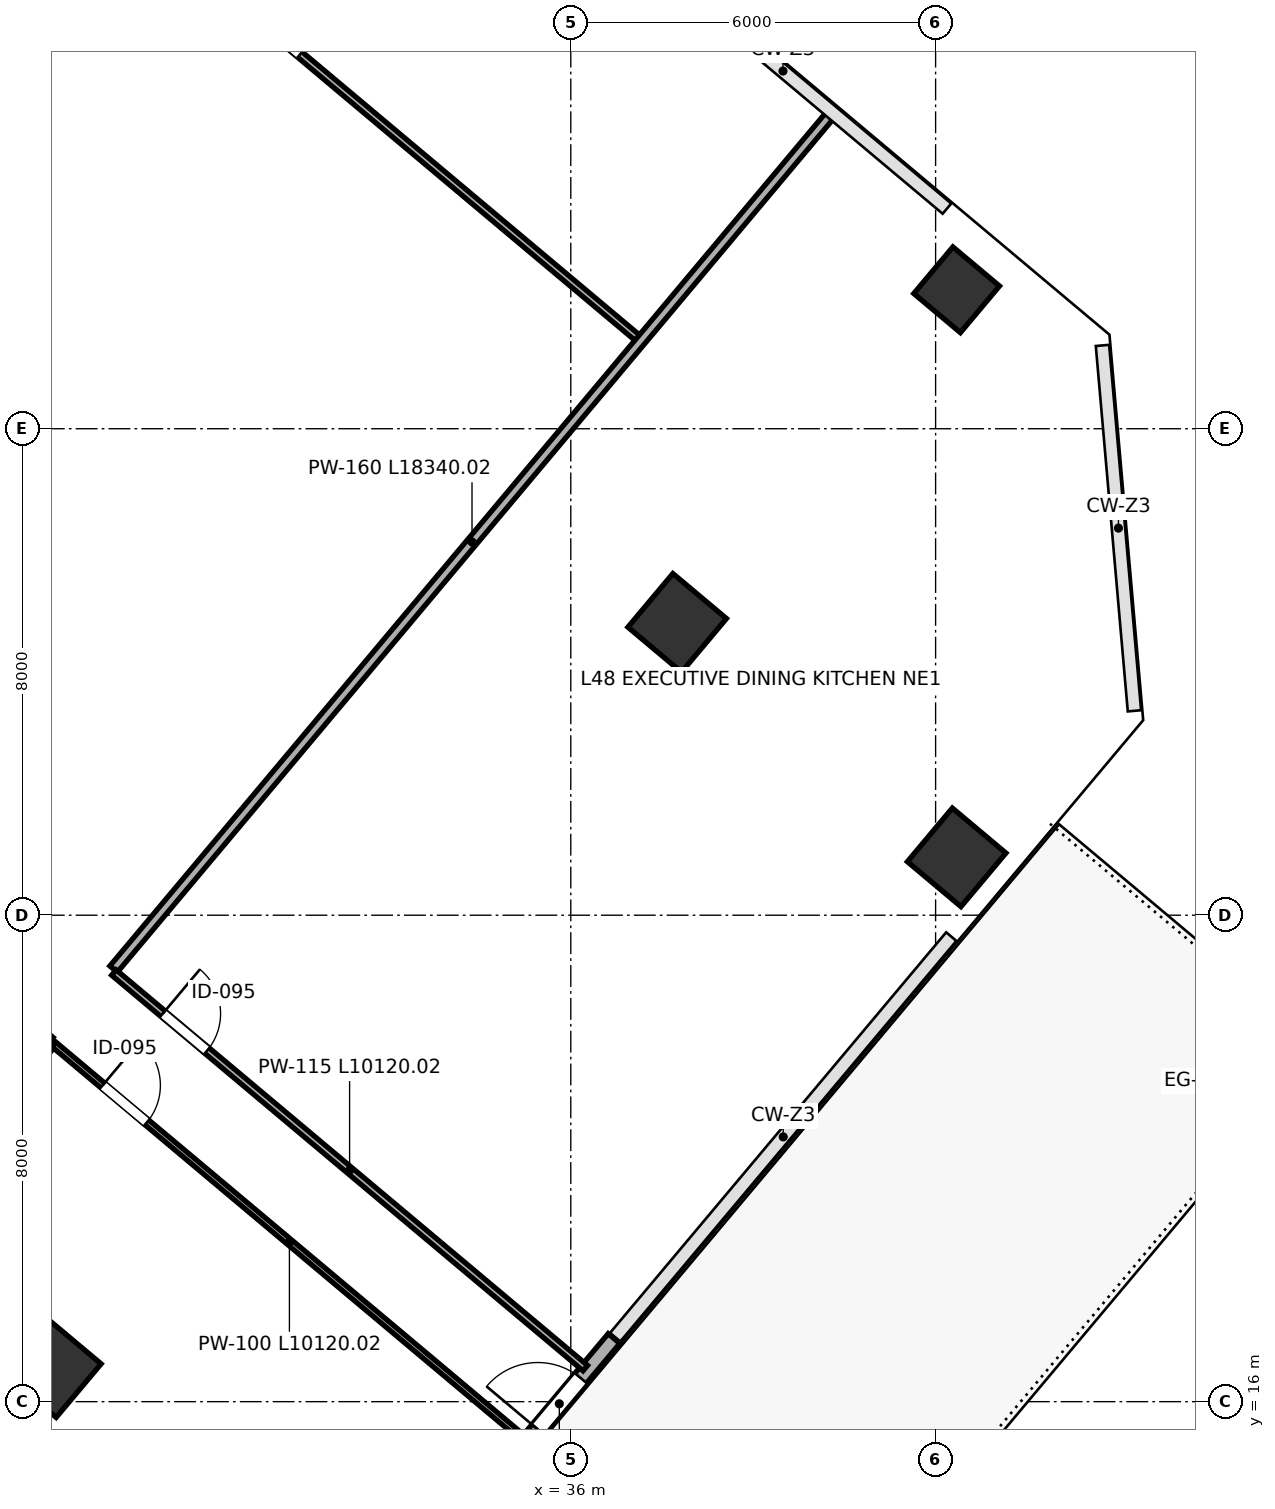
"""IFC4 building model, lengths in metres.
Left out: names, types, materials, properties, quantities, classifications, styles, units other than length and angle.
Written with IfcOpenShell. Run it as: python <this file> out.ifc"""

import sys

from ifc_helpers import new_model, si_unit, direction, frame, frame_2d, origin, origin_2d, place, context, subcontext, project, spatial, rectangle, extrude, source, transform, mapped, element, fill, save


model = new_model("IFC4")
c1 = context("Model", 3, precision=1e-05, world=origin(), true_north=direction((0.0, 1.0)))
c2 = subcontext(c1, "Body", "Model", "MODEL_VIEW")
j1 = project(units=[si_unit("LENGTHUNIT", "METRE"), si_unit("PLANEANGLEUNIT", "RADIAN")], contexts=[c1])
p1 = place(None, origin())
s1 = spatial("IfcSite", under=j1, at=p1, CompositionType="ELEMENT")
p2 = place(p1, origin())
s2 = spatial("IfcBuilding", under=s1, at=p2, CompositionType="ELEMENT")
p3 = place(p2, frame((0.0, 0.0, 215.2)))
s3 = spatial("IfcBuildingStorey", under=s2, at=p3, CompositionType="ELEMENT", Elevation=215.2)
m1 = source(origin(), c2, "Body", "SweptSolid", [
    extrude(rectangle(XDim=1.15, YDim=1.15, at=origin_2d()), origin(), (0.0, 0.0, 1.0), 5.399),
])
for number, where, z_axis, x_axis in (
    (1, (27.465, 16.551, 0.001), (0.0, 0.0, 1.0), (-0.766, 0.643, 0.0)),
    (2, (37.75, 28.808, 0.001), (0.0, 0.0, 1.0), (-0.766, 0.643, 0.0)),
):
    element("IfcColumn", number, at=place(p3, frame(where, z_axis=z_axis, x_axis=x_axis)), inside=s3, PredefinedType="COLUMN", context=c2, shape_type="MappedRepresentation", body=[
        mapped(m1, transform((0.0, 0.0, 0.0), scale=1.0)),
    ])
m2 = source(origin(), c2, "Body", "SweptSolid", [
    extrude(rectangle(XDim=1.0, YDim=1.0, at=origin_2d()), origin(), (0.0, 0.0, 1.0), 5.399),
])
p4 = place(p3, frame((42.346, 34.285, 0.001), z_axis=(0.0, 0.0, 1.0), x_axis=(-0.766044443119, 0.642787609687, 0.0)))
e3 = element("IfcColumn", 3, at=p4, inside=s3, PredefinedType="COLUMN", context=c2, shape_type="MappedRepresentation", body=[
    mapped(m2, transform((0.0, 0.0, 0.0), scale=1.0)),
])
m3 = source(origin(), c2, "Body", "SweptSolid", [
    extrude(rectangle(XDim=1.15, YDim=1.15, at=origin_2d()), origin(), (0.0, 0.0, 1.0), 5.399),
])
p5 = place(p3, frame((42.346, 24.951, 0.001), z_axis=(0.0, 0.0, 1.0), x_axis=(-0.766044443119, 0.642787609687, 0.0)))
e4 = element("IfcColumn", 4, at=p5, inside=s3, PredefinedType="COLUMN", context=c2, shape_type="MappedRepresentation", body=[
    mapped(m3, transform((0.0, 0.0, 0.0), scale=1.0)),
])
p6 = place(p3, frame((34.911, 14.893, 0.0), z_axis=(0.0, 0.0, 1.0), x_axis=(0.642770757628, 0.766058583359, 0.0)))
e5 = element("IfcWall", 5, at=p6, inside=s3, PredefinedType="SOLIDWALL", context=c2, shape_type="SweptSolid", body=[
    extrude(rectangle(XDim=2.8, YDim=0.25, at=frame_2d((1.4, 0.0))), origin(), (0.0, 0.0, 1.0), 5.16),
])
p7 = place(p6, frame((0.85, 0.0, 0.0)))
e6 = element("IfcOpeningElement", 6, at=p7, cuts=e5, PredefinedType="OPENING", context=c2, shape_type="SweptSolid", body=[
    extrude(rectangle(XDim=1.1, YDim=2.2, at=frame_2d((0.55, 1.1))), frame((0.0, 0.135, 0.0), z_axis=(0.0, -1.0, 0.0), x_axis=(1.0, 0.0, 0.0)), (0.0, 0.0, 1.0), 0.27),
])
p8 = place(p3, frame((25.093, 23.894, 0.0), z_axis=(0.0, 0.0, 1.0), x_axis=(0.76609008417, -0.642733212878, 0.0)))
e7 = element("IfcWall", 7, at=p8, inside=s3, PredefinedType="PARTITIONING", context=c2, shape_type="SweptSolid", body=[
    extrude(rectangle(XDim=3.058, YDim=0.16, at=frame_2d((1.529, 0.0))), origin(), (0.0, 0.0, 1.0), 5.16),
])
p9 = place(p3, frame((16.416, 50.848, 0.0), z_axis=(0.0, 0.0, 1.0), x_axis=(0.766042472976, -0.642789957604, 0.0)))
e8 = element("IfcWall", 8, at=p9, inside=s3, PredefinedType="PARTITIONING", context=c2, shape_type="SweptSolid", body=[
    extrude(rectangle(XDim=27.03, YDim=0.115, at=frame_2d((13.515, 0.0))), origin(), (0.0, 0.0, 1.0), 5.16),
])
p10 = place(p9, frame((18.8, 0.0, 0.0)))
e9 = element("IfcOpeningElement", 9, at=p10, cuts=e8, PredefinedType="OPENING", context=c2, shape_type="SweptSolid", body=[
    extrude(rectangle(XDim=0.95, YDim=2.15, at=frame_2d((0.475, 1.075))), frame((0.0, 0.067, 0.0), z_axis=(0.0, -1.0, 0.0), x_axis=(1.0, 0.0, 0.0)), (0.0, 0.0, 1.0), 0.135),
])
p11 = place(p3, frame((28.481, 23.114, 0.0), z_axis=(0.0, 0.0, 1.0), x_axis=(0.642788958176, 0.7660433116, 0.0)))
e10 = element("IfcWall", 10, at=p11, inside=s3, PredefinedType="PARTITIONING", context=c2, shape_type="SweptSolid", body=[
    extrude(rectangle(XDim=18.34, YDim=0.16, at=frame_2d((9.17, 0.0))), origin(), (0.0, 0.0, 1.0), 4.395),
])
p12 = place(p3, frame((19.622, 12.556, 0.0), z_axis=(0.0, 0.0, 1.0), x_axis=(0.642789011194, 0.766043267112, 0.0)))
e11 = element("IfcWall", 11, at=p12, inside=s3, PredefinedType="PARTITIONING", context=c2, shape_type="SweptSolid", body=[
    extrude(rectangle(XDim=12.162, YDim=0.16, at=frame_2d((6.081, 0.0))), origin(), (0.0, 0.0, 1.0), 5.16),
])
p13 = place(p3, frame((28.486, 23.057, 0.0), z_axis=(0.0, 0.0, 1.0), x_axis=(0.766053586218, -0.642776713208, 0.0)))
e12 = element("IfcWall", 12, at=p13, inside=s3, PredefinedType="PARTITIONING", context=c2, shape_type="SweptSolid", body=[
    extrude(rectangle(XDim=10.12, YDim=0.115, at=frame_2d((5.06, 0.0))), origin(), (0.0, 0.0, 1.0), 5.16),
])
p14 = place(p13, frame((1.05, 0.0, 0.0)))
e13 = element("IfcOpeningElement", 13, at=p14, cuts=e12, PredefinedType="OPENING", context=c2, shape_type="SweptSolid", body=[
    extrude(rectangle(XDim=0.95, YDim=2.15, at=frame_2d((0.475, 1.075))), frame((0.0, 0.067, 0.0), z_axis=(0.0, -1.0, 0.0), x_axis=(1.0, 0.0, 0.0)), (0.0, 0.0, 1.0), 0.135),
])
p15 = place(p3, frame((27.496, 21.877, 0.0), z_axis=(0.0, 0.0, 1.0), x_axis=(0.766053586218, -0.642776713208, 0.0)))
e14 = element("IfcWall", 14, at=p15, inside=s3, PredefinedType="PARTITIONING", context=c2, shape_type="SweptSolid", body=[
    extrude(rectangle(XDim=10.12, YDim=0.1, at=frame_2d((5.06, 0.0))), origin(), (0.0, 0.0, 1.0), 5.16),
])
p16 = place(p15, frame((1.05, 0.0, 0.0)))
e15 = element("IfcOpeningElement", 15, at=p16, cuts=e14, PredefinedType="OPENING", context=c2, shape_type="SweptSolid", body=[
    extrude(rectangle(XDim=0.95, YDim=2.15, at=frame_2d((0.475, 1.075))), frame((0.0, 0.06, 0.0), z_axis=(0.0, -1.0, 0.0), x_axis=(1.0, 0.0, 0.0)), (0.0, 0.0, 1.0), 0.12),
])
m4 = source(origin(), c2, "Body", "SweptSolid", [
    extrude(rectangle(XDim=1.1, YDim=2.2, at=frame_2d((0.55, 1.1))), frame((0.0, 0.025, 0.0), z_axis=(0.0, -1.0, 0.0), x_axis=(1.0, 0.0, 0.0)), (0.0, 0.0, 1.0), 0.05),
])
p17 = place(p7, origin())
e16 = element("IfcDoor", 16, at=p17, inside=s3, OperationType="SINGLE_SWING_LEFT", PredefinedType="DOOR", context=c2, shape_type="MappedRepresentation", body=[
    mapped(m4, transform((0.0, 0.0, 0.0), scale=1.0)),
])
fill(e6, e16)
m5 = source(origin(), c2, "Body", "SweptSolid", [
    extrude(rectangle(XDim=0.95, YDim=2.15, at=frame_2d((0.475, 1.075))), frame((0.0, 0.025, 0.0), z_axis=(0.0, -1.0, 0.0), x_axis=(1.0, 0.0, 0.0)), (0.0, 0.0, 1.0), 0.05),
])
p18 = place(p10, origin())
e17 = element("IfcDoor", 17, at=p18, inside=s3, OperationType="SINGLE_SWING_LEFT", PredefinedType="DOOR", context=c2, shape_type="MappedRepresentation", body=[
    mapped(m5, transform((0.0, 0.0, 0.0), scale=1.0)),
])
fill(e9, e17)
p19 = place(p14, origin())
e18 = element("IfcDoor", 18, at=p19, inside=s3, OperationType="SINGLE_SWING_LEFT", PredefinedType="DOOR", context=c2, shape_type="MappedRepresentation", body=[
    mapped(m5, transform((0.0, 0.0, 0.0), scale=1.0)),
])
fill(e13, e18)
p20 = place(p16, origin())
e19 = element("IfcDoor", 19, at=p20, inside=s3, OperationType="SINGLE_SWING_LEFT", PredefinedType="DOOR", context=c2, shape_type="MappedRepresentation", body=[
    mapped(m5, transform((0.0, 0.0, 0.0), scale=1.0)),
])
fill(e15, e19)
save(model, sys.argv[1])
